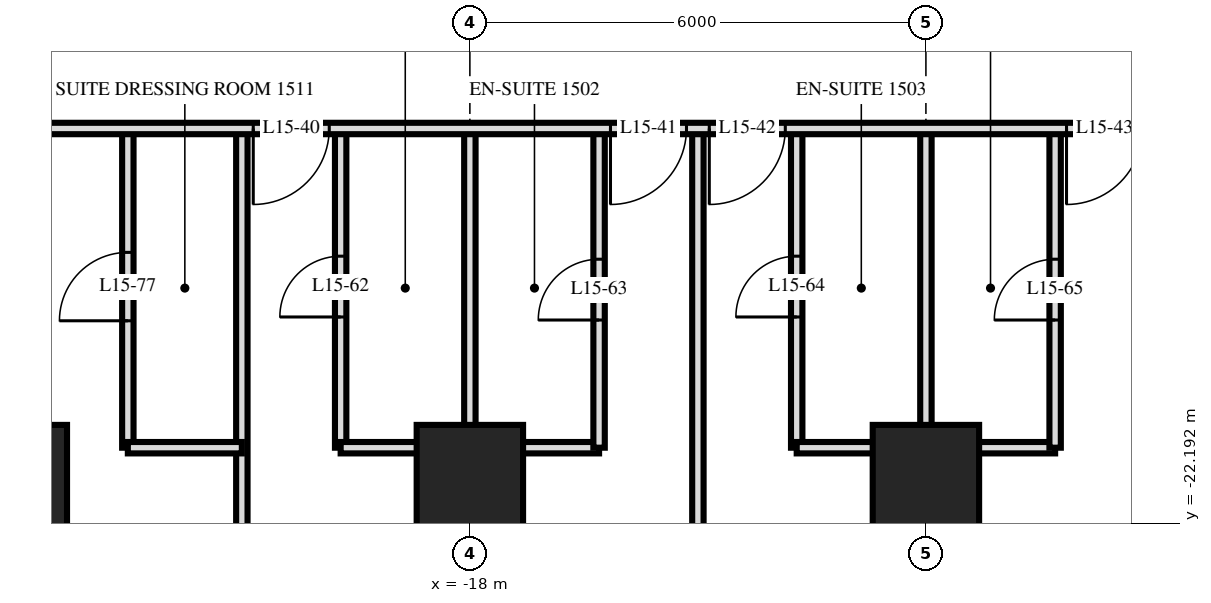
"""IFC4 building model, lengths in metres.
Left out: names, types, materials, properties, quantities, classifications, styles, units other than length and angle.
Written with IfcOpenShell. Run it as: python <this file> out.ifc"""

import sys

from ifc_helpers import new_model, si_unit, direction, frame, frame_2d, origin, origin_2d, place, context, subcontext, project, spatial, rectangle, extrude, element, fill, save


model = new_model("IFC4")
c1 = context("Model", 3, precision=1e-05, world=origin(), true_north=direction((0.0, 1.0)))
c2 = subcontext(c1, "Body", "Model", "MODEL_VIEW")
j1 = project(units=[si_unit("LENGTHUNIT", "METRE"), si_unit("PLANEANGLEUNIT", "RADIAN")], contexts=[c1])
p1 = place(None, origin())
s1 = spatial("IfcSite", under=j1, at=p1, CompositionType="ELEMENT")
p2 = place(p1, origin())
s2 = spatial("IfcBuilding", under=s1, at=p2, CompositionType="ELEMENT")
p3 = place(p2, frame((0.0, 0.0, 63.6)))
s3 = spatial("IfcBuildingStorey", under=s2, at=p3, CompositionType="ELEMENT", Elevation=63.6)
for number, where, z_axis, x_axis in (
    (1, (-24.0, -21.6, 0.0), (0.0, 0.0, 1.0), (1.0, 0.0, 0.0)),
    (2, (-18.0, -21.6, 0.0), (0.0, 0.0, 1.0), (1.0, 0.0, 0.0)),
    (3, (-12.0, -21.6, 0.0), (0.0, 0.0, 1.0), (1.0, 0.0, 0.0)),
):
    element("IfcColumn", number, at=place(p3, frame(where, z_axis=z_axis, x_axis=x_axis)), inside=s3, PredefinedType="COLUMN", context=c2, shape_type="SweptSolid", body=[
        extrude(rectangle(XDim=1.4, YDim=1.4, at=origin_2d()), origin(), (0.0, 0.0, 1.0), 3.6),
    ])
p4 = place(p3, frame((-10.3, -21.2, 0.0), z_axis=(0.0, 0.0, 1.0), x_axis=(0.0, 1.0, 0.0)))
e4 = element("IfcWall", 4, at=p4, inside=s3, PredefinedType="PARTITIONING", context=c2, shape_type="SweptSolid", body=[
    extrude(rectangle(XDim=4.2, YDim=0.15, at=frame_2d((2.1, 0.0))), origin(), (0.0, 0.0, 1.0), 3.32),
])
p5 = place(p4, frame((1.68, 0.0, 0.0)))
e5 = element("IfcOpeningElement", 5, at=p5, cuts=e4, PredefinedType="OPENING", context=c2, shape_type="SweptSolid", body=[
    extrude(rectangle(XDim=0.8, YDim=2.1, at=frame_2d((0.4, 1.05))), frame((0.0, 0.085, 0.0), z_axis=(0.0, -1.0, 0.0), x_axis=(1.0, 0.0, 0.0)), (0.0, 0.0, 1.0), 0.17),
])
p6 = place(p3, frame((-12.0, -29.22, 0.0), z_axis=(0.0, 0.0, 1.0), x_axis=(0.0, 1.0, 0.0)))
e6 = element("IfcWall", 6, at=p6, inside=s3, PredefinedType="PARTITIONING", context=c2, shape_type="SweptSolid", body=[
    extrude(rectangle(XDim=12.22, YDim=0.15, at=frame_2d((6.11, 0.0))), origin(), (0.0, 0.0, 1.0), 3.32),
])
p7 = place(p3, frame((-13.7, -21.2, 0.0), z_axis=(0.0, 0.0, 1.0), x_axis=(0.0, 1.0, 0.0)))
e7 = element("IfcWall", 7, at=p7, inside=s3, PredefinedType="PARTITIONING", context=c2, shape_type="SweptSolid", body=[
    extrude(rectangle(XDim=4.2, YDim=0.15, at=frame_2d((2.1, 0.0))), origin(), (0.0, 0.0, 1.0), 3.32),
])
p8 = place(p7, frame((1.72, 0.0, 0.0)))
e8 = element("IfcOpeningElement", 8, at=p8, cuts=e7, PredefinedType="OPENING", context=c2, shape_type="SweptSolid", body=[
    extrude(rectangle(XDim=0.8, YDim=2.1, at=frame_2d((0.4, 1.05))), frame((0.0, 0.085, 0.0), z_axis=(0.0, -1.0, 0.0), x_axis=(1.0, 0.0, 0.0)), (0.0, 0.0, 1.0), 0.17),
])
p9 = place(p3, frame((-15.0, -29.22, 0.0), z_axis=(0.0, 0.0, 1.0), x_axis=(0.0, 1.0, 0.0)))
e9 = element("IfcWall", 9, at=p9, inside=s3, PredefinedType="PARTITIONING", context=c2, shape_type="SweptSolid", body=[
    extrude(rectangle(XDim=12.22, YDim=0.15, at=frame_2d((6.11, 0.0))), origin(), (0.0, 0.0, 1.0), 3.32),
])
p10 = place(p3, frame((-16.3, -21.2, 0.0), z_axis=(0.0, 0.0, 1.0), x_axis=(0.0, 1.0, 0.0)))
e10 = element("IfcWall", 10, at=p10, inside=s3, PredefinedType="PARTITIONING", context=c2, shape_type="SweptSolid", body=[
    extrude(rectangle(XDim=4.2, YDim=0.15, at=frame_2d((2.1, 0.0))), origin(), (0.0, 0.0, 1.0), 3.32),
])
p11 = place(p10, frame((1.68, 0.0, 0.0)))
e11 = element("IfcOpeningElement", 11, at=p11, cuts=e10, PredefinedType="OPENING", context=c2, shape_type="SweptSolid", body=[
    extrude(rectangle(XDim=0.8, YDim=2.1, at=frame_2d((0.4, 1.05))), frame((0.0, 0.085, 0.0), z_axis=(0.0, -1.0, 0.0), x_axis=(1.0, 0.0, 0.0)), (0.0, 0.0, 1.0), 0.17),
])
p12 = place(p3, frame((-18.0, -29.22, 0.0), z_axis=(0.0, 0.0, 1.0), x_axis=(0.0, 1.0, 0.0)))
e12 = element("IfcWall", 12, at=p12, inside=s3, PredefinedType="PARTITIONING", context=c2, shape_type="SweptSolid", body=[
    extrude(rectangle(XDim=12.22, YDim=0.15, at=frame_2d((6.11, 0.0))), origin(), (0.0, 0.0, 1.0), 3.32),
])
p13 = place(p3, frame((-19.7, -21.2, 0.0), z_axis=(0.0, 0.0, 1.0), x_axis=(0.0, 1.0, 0.0)))
e13 = element("IfcWall", 13, at=p13, inside=s3, PredefinedType="PARTITIONING", context=c2, shape_type="SweptSolid", body=[
    extrude(rectangle(XDim=4.2, YDim=0.15, at=frame_2d((2.1, 0.0))), origin(), (0.0, 0.0, 1.0), 3.32),
])
p14 = place(p13, frame((1.72, 0.0, 0.0)))
e14 = element("IfcOpeningElement", 14, at=p14, cuts=e13, PredefinedType="OPENING", context=c2, shape_type="SweptSolid", body=[
    extrude(rectangle(XDim=0.8, YDim=2.1, at=frame_2d((0.4, 1.05))), frame((0.0, 0.085, 0.0), z_axis=(0.0, -1.0, 0.0), x_axis=(1.0, 0.0, 0.0)), (0.0, 0.0, 1.0), 0.17),
])
p15 = place(p3, frame((-21.0, -29.22, 0.0), z_axis=(0.0, 0.0, 1.0), x_axis=(0.0, 1.0, 0.0)))
e15 = element("IfcWall", 15, at=p15, inside=s3, PredefinedType="PARTITIONING", context=c2, shape_type="SweptSolid", body=[
    extrude(rectangle(XDim=12.22, YDim=0.15, at=frame_2d((6.11, 0.0))), origin(), (0.0, 0.0, 1.0), 3.32),
])
p16 = place(p3, frame((-22.5, -21.2, 0.0), z_axis=(0.0, 0.0, 1.0), x_axis=(0.0, 1.0, 0.0)))
e16 = element("IfcWall", 16, at=p16, inside=s3, PredefinedType="PARTITIONING", context=c2, shape_type="SweptSolid", body=[
    extrude(rectangle(XDim=4.2, YDim=0.15, at=frame_2d((2.1, 0.0))), origin(), (0.0, 0.0, 1.0), 3.32),
])
p17 = place(p16, frame((1.67, 0.0, 0.0)))
e17 = element("IfcOpeningElement", 17, at=p17, cuts=e16, PredefinedType="OPENING", context=c2, shape_type="SweptSolid", body=[
    extrude(rectangle(XDim=0.9, YDim=2.1, at=frame_2d((0.45, 1.05))), frame((0.0, 0.085, 0.0), z_axis=(0.0, -1.0, 0.0), x_axis=(1.0, 0.0, 0.0)), (0.0, 0.0, 1.0), 0.17),
])
p18 = place(p3, frame((-22.5, -21.2, 0.0), z_axis=(0.0, 0.0, 1.0), x_axis=(1.0, 0.0, 0.0)))
e18 = element("IfcWall", 18, at=p18, inside=s3, PredefinedType="PARTITIONING", context=c2, shape_type="SweptSolid", body=[
    extrude(rectangle(XDim=1.5, YDim=0.15, at=frame_2d((0.75, 0.0))), origin(), (0.0, 0.0, 1.0), 3.32),
])
for number, where, z_axis, x_axis in (
    (19, (-19.7, -21.2, 0.0), (0.0, 0.0, 1.0), (1.0, 0.0, 0.0)),
    (20, (-13.7, -21.2, 0.0), (0.0, 0.0, 1.0), (1.0, 0.0, 0.0)),
):
    element("IfcWall", number, at=place(p3, frame(where, z_axis=z_axis, x_axis=x_axis)), inside=s3, PredefinedType="PARTITIONING", context=c2, shape_type="SweptSolid", body=[
        extrude(rectangle(XDim=3.4, YDim=0.15, at=frame_2d((1.7, 0.0))), origin(), (0.0, 0.0, 1.0), 3.32),
    ])
p19 = place(p3, frame((-33.12, -17.0, 0.0), z_axis=(0.0, 0.0, 1.0), x_axis=(1.0, 0.0, 0.0)))
e21 = element("IfcWall", 21, at=p19, inside=s3, PredefinedType="PARTITIONING", context=c2, shape_type="SweptSolid", body=[
    extrude(rectangle(XDim=66.24, YDim=0.15, at=frame_2d((33.12, 0.0))), origin(), (0.0, 0.0, 1.0), 3.32),
])
p20 = place(p19, frame((12.27, 0.0, 0.0)))
e22 = element("IfcOpeningElement", 22, at=p20, cuts=e21, PredefinedType="OPENING", context=c2, shape_type="SweptSolid", body=[
    extrude(rectangle(XDim=1.0, YDim=2.1, at=frame_2d((0.5, 1.05))), frame((0.0, 0.085, 0.0), z_axis=(0.0, -1.0, 0.0), x_axis=(1.0, 0.0, 0.0)), (0.0, 0.0, 1.0), 0.17),
])
p21 = place(p19, frame((16.97, 0.0, 0.0)))
e23 = element("IfcOpeningElement", 23, at=p21, cuts=e21, PredefinedType="OPENING", context=c2, shape_type="SweptSolid", body=[
    extrude(rectangle(XDim=1.0, YDim=2.1, at=frame_2d((0.5, 1.05))), frame((0.0, 0.085, 0.0), z_axis=(0.0, -1.0, 0.0), x_axis=(1.0, 0.0, 0.0)), (0.0, 0.0, 1.0), 0.17),
])
p22 = place(p19, frame((18.27, 0.0, 0.0)))
e24 = element("IfcOpeningElement", 24, at=p22, cuts=e21, PredefinedType="OPENING", context=c2, shape_type="SweptSolid", body=[
    extrude(rectangle(XDim=1.0, YDim=2.1, at=frame_2d((0.5, 1.05))), frame((0.0, 0.085, 0.0), z_axis=(0.0, -1.0, 0.0), x_axis=(1.0, 0.0, 0.0)), (0.0, 0.0, 1.0), 0.17),
])
p23 = place(p19, frame((22.97, 0.0, 0.0)))
e25 = element("IfcOpeningElement", 25, at=p23, cuts=e21, PredefinedType="OPENING", context=c2, shape_type="SweptSolid", body=[
    extrude(rectangle(XDim=1.0, YDim=2.1, at=frame_2d((0.5, 1.05))), frame((0.0, 0.085, 0.0), z_axis=(0.0, -1.0, 0.0), x_axis=(1.0, 0.0, 0.0)), (0.0, 0.0, 1.0), 0.17),
])
p24 = place(p19, frame((24.27, 0.0, 0.0)))
e26 = element("IfcOpeningElement", 26, at=p24, cuts=e21, PredefinedType="OPENING", context=c2, shape_type="SweptSolid", body=[
    extrude(rectangle(XDim=1.0, YDim=2.1, at=frame_2d((0.5, 1.05))), frame((0.0, 0.085, 0.0), z_axis=(0.0, -1.0, 0.0), x_axis=(1.0, 0.0, 0.0)), (0.0, 0.0, 1.0), 0.17),
])
p25 = place(p19, frame((28.97, 0.0, 0.0)))
e27 = element("IfcOpeningElement", 27, at=p25, cuts=e21, PredefinedType="OPENING", context=c2, shape_type="SweptSolid", body=[
    extrude(rectangle(XDim=1.0, YDim=2.1, at=frame_2d((0.5, 1.05))), frame((0.0, 0.085, 0.0), z_axis=(0.0, -1.0, 0.0), x_axis=(1.0, 0.0, 0.0)), (0.0, 0.0, 1.0), 0.17),
])
p26 = place(p19, frame((30.27, 0.0, 0.0)))
e28 = element("IfcOpeningElement", 28, at=p26, cuts=e21, PredefinedType="OPENING", context=c2, shape_type="SweptSolid", body=[
    extrude(rectangle(XDim=1.0, YDim=2.1, at=frame_2d((0.5, 1.05))), frame((0.0, 0.085, 0.0), z_axis=(0.0, -1.0, 0.0), x_axis=(1.0, 0.0, 0.0)), (0.0, 0.0, 1.0), 0.17),
])
p27 = place(p19, frame((33.82, 0.0, 0.0)))
e29 = element("IfcOpeningElement", 29, at=p27, cuts=e21, PredefinedType="OPENING", context=c2, shape_type="SweptSolid", body=[
    extrude(rectangle(XDim=1.0, YDim=2.1, at=frame_2d((0.5, 1.05))), frame((0.0, 0.085, 0.0), z_axis=(0.0, -1.0, 0.0), x_axis=(1.0, 0.0, 0.0)), (0.0, 0.0, 1.0), 0.17),
])
p28 = place(p19, frame((46.27, 0.0, 0.0)))
e30 = element("IfcOpeningElement", 30, at=p28, cuts=e21, PredefinedType="OPENING", context=c2, shape_type="SweptSolid", body=[
    extrude(rectangle(XDim=1.0, YDim=2.1, at=frame_2d((0.5, 1.05))), frame((0.0, 0.085, 0.0), z_axis=(0.0, -1.0, 0.0), x_axis=(1.0, 0.0, 0.0)), (0.0, 0.0, 1.0), 0.17),
])
p29 = place(p19, frame((52.97, 0.0, 0.0)))
e31 = element("IfcOpeningElement", 31, at=p29, cuts=e21, PredefinedType="OPENING", context=c2, shape_type="SweptSolid", body=[
    extrude(rectangle(XDim=1.0, YDim=2.1, at=frame_2d((0.5, 1.05))), frame((0.0, 0.085, 0.0), z_axis=(0.0, -1.0, 0.0), x_axis=(1.0, 0.0, 0.0)), (0.0, 0.0, 1.0), 0.17),
])
p30 = place(p19, frame((6.05, 0.0, 0.0)))
e32 = element("IfcOpeningElement", 32, at=p30, cuts=e21, PredefinedType="OPENING", context=c2, shape_type="SweptSolid", body=[
    extrude(rectangle(XDim=1.0, YDim=2.1, at=frame_2d((0.5, 1.05))), frame((0.0, 0.085, 0.0), z_axis=(0.0, -1.0, 0.0), x_axis=(1.0, 0.0, 0.0)), (0.0, 0.0, 1.0), 0.17),
])
p31 = place(p19, frame((59.15, 0.0, 0.0)))
e33 = element("IfcOpeningElement", 33, at=p31, cuts=e21, PredefinedType="OPENING", context=c2, shape_type="SweptSolid", body=[
    extrude(rectangle(XDim=1.0, YDim=2.1, at=frame_2d((0.5, 1.05))), frame((0.0, 0.085, 0.0), z_axis=(0.0, -1.0, 0.0), x_axis=(1.0, 0.0, 0.0)), (0.0, 0.0, 1.0), 0.17),
])
p32 = place(p20, frame((0.5, 0.0, 0.0), z_axis=(0.0, 0.0, 1.0), x_axis=(-1.0, 0.0, 0.0)))
e34 = element("IfcDoor", 34, at=p32, inside=s3, OperationType="SINGLE_SWING_LEFT", PredefinedType="DOOR", context=c2, shape_type="SweptSolid", body=[
    extrude(rectangle(XDim=1.0, YDim=2.1, at=frame_2d((0.0, 1.05))), frame((0.0, -0.025, 0.0), z_axis=(0.0, 1.0, 0.0), x_axis=(-1.0, 0.0, 0.0)), (0.0, 0.0, 1.0), 0.05),
])
fill(e22, e34)
p33 = place(p21, frame((0.5, 0.0, 0.0), z_axis=(0.0, 0.0, 1.0), x_axis=(-1.0, 0.0, 0.0)))
e35 = element("IfcDoor", 35, at=p33, inside=s3, OperationType="SINGLE_SWING_LEFT", PredefinedType="DOOR", context=c2, shape_type="SweptSolid", body=[
    extrude(rectangle(XDim=1.0, YDim=2.1, at=frame_2d((0.0, 1.05))), frame((0.0, -0.025, 0.0), z_axis=(0.0, 1.0, 0.0), x_axis=(-1.0, 0.0, 0.0)), (0.0, 0.0, 1.0), 0.05),
])
fill(e23, e35)
p34 = place(p22, frame((0.5, 0.0, 0.0), z_axis=(0.0, 0.0, 1.0), x_axis=(-1.0, 0.0, 0.0)))
e36 = element("IfcDoor", 36, at=p34, inside=s3, OperationType="SINGLE_SWING_LEFT", PredefinedType="DOOR", context=c2, shape_type="SweptSolid", body=[
    extrude(rectangle(XDim=1.0, YDim=2.1, at=frame_2d((0.0, 1.05))), frame((0.0, -0.025, 0.0), z_axis=(0.0, 1.0, 0.0), x_axis=(-1.0, 0.0, 0.0)), (0.0, 0.0, 1.0), 0.05),
])
fill(e24, e36)
p35 = place(p23, frame((0.5, 0.0, 0.0), z_axis=(0.0, 0.0, 1.0), x_axis=(-1.0, 0.0, 0.0)))
e37 = element("IfcDoor", 37, at=p35, inside=s3, OperationType="SINGLE_SWING_LEFT", PredefinedType="DOOR", context=c2, shape_type="SweptSolid", body=[
    extrude(rectangle(XDim=1.0, YDim=2.1, at=frame_2d((0.0, 1.05))), frame((0.0, -0.025, 0.0), z_axis=(0.0, 1.0, 0.0), x_axis=(-1.0, 0.0, 0.0)), (0.0, 0.0, 1.0), 0.05),
])
fill(e25, e37)
p36 = place(p14, origin())
e38 = element("IfcDoor", 38, at=p36, inside=s3, OperationType="SINGLE_SWING_RIGHT", PredefinedType="DOOR", context=c2, shape_type="SweptSolid", body=[
    extrude(rectangle(XDim=0.8, YDim=2.1, at=frame_2d((0.4, 1.05))), frame((0.0, 0.025, 0.0), z_axis=(0.0, -1.0, 0.0), x_axis=(1.0, 0.0, 0.0)), (0.0, 0.0, 1.0), 0.05),
])
fill(e14, e38)
p37 = place(p11, origin())
e39 = element("IfcDoor", 39, at=p37, inside=s3, OperationType="SINGLE_SWING_RIGHT", PredefinedType="DOOR", context=c2, shape_type="SweptSolid", body=[
    extrude(rectangle(XDim=0.8, YDim=2.1, at=frame_2d((0.4, 1.05))), frame((0.0, 0.025, 0.0), z_axis=(0.0, -1.0, 0.0), x_axis=(1.0, 0.0, 0.0)), (0.0, 0.0, 1.0), 0.05),
])
fill(e11, e39)
p38 = place(p8, origin())
e40 = element("IfcDoor", 40, at=p38, inside=s3, OperationType="SINGLE_SWING_RIGHT", PredefinedType="DOOR", context=c2, shape_type="SweptSolid", body=[
    extrude(rectangle(XDim=0.8, YDim=2.1, at=frame_2d((0.4, 1.05))), frame((0.0, 0.025, 0.0), z_axis=(0.0, -1.0, 0.0), x_axis=(1.0, 0.0, 0.0)), (0.0, 0.0, 1.0), 0.05),
])
fill(e8, e40)
p39 = place(p5, origin())
e41 = element("IfcDoor", 41, at=p39, inside=s3, OperationType="SINGLE_SWING_RIGHT", PredefinedType="DOOR", context=c2, shape_type="SweptSolid", body=[
    extrude(rectangle(XDim=0.8, YDim=2.1, at=frame_2d((0.4, 1.05))), frame((0.0, 0.025, 0.0), z_axis=(0.0, -1.0, 0.0), x_axis=(1.0, 0.0, 0.0)), (0.0, 0.0, 1.0), 0.05),
])
fill(e5, e41)
p40 = place(p17, origin())
e42 = element("IfcDoor", 42, at=p40, inside=s3, OperationType="SINGLE_SWING_RIGHT", PredefinedType="DOOR", context=c2, shape_type="SweptSolid", body=[
    extrude(rectangle(XDim=0.9, YDim=2.1, at=frame_2d((0.45, 1.05))), frame((0.0, 0.025, 0.0), z_axis=(0.0, -1.0, 0.0), x_axis=(1.0, 0.0, 0.0)), (0.0, 0.0, 1.0), 0.05),
])
fill(e17, e42)
save(model, sys.argv[1])
